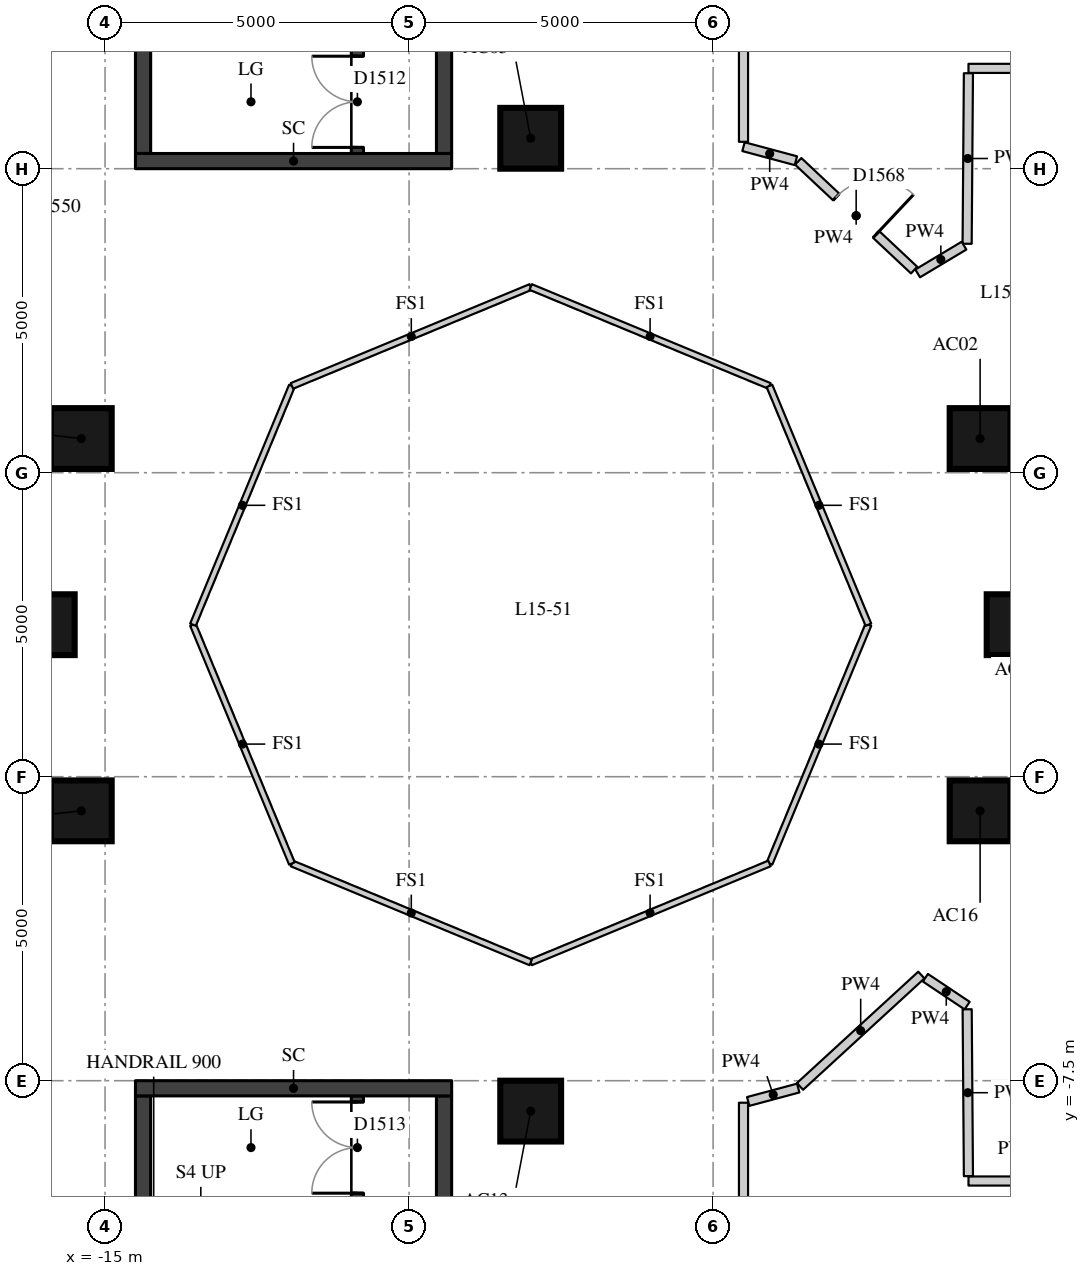
"""IFC4 building model, lengths in metres.
Left out: names, types, materials, properties, quantities, classifications, styles, units other than length and angle.
Written with IfcOpenShell. Run it as: python <this file> out.ifc"""

import sys

from ifc_helpers import new_model, si_unit, direction, frame, frame_2d, origin, origin_2d, place, context, subcontext, project, spatial, rectangle, extrude, element, fill, save


model = new_model("IFC4")
c1 = context("Model", 3, precision=1e-05, world=origin(), true_north=direction((0.0, 1.0)))
c2 = subcontext(c1, "Body", "Model", "MODEL_VIEW")
j1 = project(units=[si_unit("LENGTHUNIT", "METRE"), si_unit("PLANEANGLEUNIT", "RADIAN")], contexts=[c1])
p1 = place(None, origin())
s1 = spatial("IfcSite", under=j1, at=p1, CompositionType="ELEMENT")
p2 = place(p1, origin())
s2 = spatial("IfcBuilding", under=s1, at=p2, CompositionType="ELEMENT")
p3 = place(p2, frame((0.0, 0.0, 58.0)))
s3 = spatial("IfcBuildingStorey", under=s2, at=p3, CompositionType="ELEMENT", Elevation=58.0)
for number, where, z_axis, x_axis in (
    (1, (0.0, 0.0, 0.0), (0.0, 0.0, 1.0), (1.0, 0.0, 0.0)),
    (2, (-0.609, 3.062, 0.0), (0.0, 0.0, 1.0), (1.0, 0.0, 0.0)),
    (3, (-8.0, 8.0, 0.0), (0.0, 0.0, 1.0), (1.0, 0.0, 0.0)),
    (4, (-15.391, 3.062, 0.0), (0.0, 0.0, 1.0), (1.0, 0.0, 0.0)),
    (5, (-16.0, 0.0, 0.0), (0.0, 0.0, 1.0), (1.0, 0.0, 0.0)),
    (6, (-15.391, -3.062, 0.0), (0.0, 0.0, 1.0), (1.0, 0.0, 0.0)),
    (7, (-8.0, -8.0, 0.0), (0.0, 0.0, 1.0), (1.0, 0.0, 0.0)),
    (8, (-0.609, -3.062, 0.0), (0.0, 0.0, 1.0), (1.0, 0.0, 0.0)),
):
    element("IfcColumn", number, at=place(p3, frame(where, z_axis=z_axis, x_axis=x_axis)), inside=s3, PredefinedType="COLUMN", context=c2, shape_type="SweptSolid", body=[
        extrude(rectangle(XDim=1.0, YDim=1.0, at=origin_2d()), origin(), (0.0, 0.0, 1.0), 3.3),
    ])
p4 = place(p3, frame((-10.85, 7.75, 0.0), z_axis=(0.0, 0.0, 1.0), x_axis=(0.0, 1.0, 0.0)))
e9 = element("IfcWall", 9, at=p4, inside=s3, PredefinedType="SHEAR", context=c2, shape_type="SweptSolid", body=[
    extrude(rectangle(XDim=6.0, YDim=0.2, at=frame_2d((3.0, 0.0))), origin(), (0.0, 0.0, 1.0), 3.02),
])
p5 = place(p4, frame((0.1, 0.0, 0.0)))
e10 = element("IfcOpeningElement", 10, at=p5, cuts=e9, PredefinedType="OPENING", context=c2, shape_type="SweptSolid", body=[
    extrude(rectangle(XDim=1.5, YDim=2.1, at=frame_2d((0.75, 1.05))), frame((0.0, 0.11, 0.0), z_axis=(0.0, -1.0, 0.0), x_axis=(1.0, 0.0, 0.0)), (0.0, 0.0, 1.0), 0.22),
])
p6 = place(p3, frame((-10.85, -13.75, 0.0), z_axis=(0.0, 0.0, 1.0), x_axis=(0.0, 1.0, 0.0)))
e11 = element("IfcWall", 11, at=p6, inside=s3, PredefinedType="SHEAR", context=c2, shape_type="SweptSolid", body=[
    extrude(rectangle(XDim=6.0, YDim=0.2, at=frame_2d((3.0, 0.0))), origin(), (0.0, 0.0, 1.0), 3.02),
])
p7 = place(p6, frame((4.4, 0.0, 0.0)))
e12 = element("IfcOpeningElement", 12, at=p7, cuts=e11, PredefinedType="OPENING", context=c2, shape_type="SweptSolid", body=[
    extrude(rectangle(XDim=1.5, YDim=2.1, at=frame_2d((0.75, 1.05))), frame((0.0, 0.11, 0.0), z_axis=(0.0, -1.0, 0.0), x_axis=(1.0, 0.0, 0.0)), (0.0, 0.0, 1.0), 0.22),
])
p8 = place(p3, frame((-14.375, 7.75, -0.28), z_axis=(0.0, 0.0, 1.0), x_axis=(0.0, 1.0, 0.0)))
e13 = element("IfcWall", 13, at=p8, inside=s3, PredefinedType="SHEAR", context=c2, shape_type="SweptSolid", body=[
    extrude(rectangle(XDim=6.0, YDim=0.25, at=frame_2d((3.0, 0.0))), origin(), (0.0, 0.0, 1.0), 3.3),
])
p9 = place(p3, frame((-9.425, 7.75, -0.28), z_axis=(0.0, 0.0, 1.0), x_axis=(0.0, 1.0, 0.0)))
e14 = element("IfcWall", 14, at=p9, inside=s3, PredefinedType="SHEAR", context=c2, shape_type="SweptSolid", body=[
    extrude(rectangle(XDim=6.0, YDim=0.25, at=frame_2d((3.0, 0.0))), origin(), (0.0, 0.0, 1.0), 3.3),
])
p10 = place(p9, frame((2.1, 0.0, 0.28)))
e15 = element("IfcOpeningElement", 15, at=p10, cuts=e14, PredefinedType="OPENING", context=c2, shape_type="SweptSolid", body=[
    extrude(rectangle(XDim=1.5, YDim=2.1, at=frame_2d((0.75, 1.05))), frame((0.0, 0.135, 0.0), z_axis=(0.0, -1.0, 0.0), x_axis=(1.0, 0.0, 0.0)), (0.0, 0.0, 1.0), 0.27),
])
p11 = place(p3, frame((-14.5, 7.625, -0.28), z_axis=(0.0, 0.0, 1.0), x_axis=(1.0, 0.0, 0.0)))
e16 = element("IfcWall", 16, at=p11, inside=s3, PredefinedType="SHEAR", context=c2, shape_type="SweptSolid", body=[
    extrude(rectangle(XDim=5.2, YDim=0.25, at=frame_2d((2.6, 0.0))), origin(), (0.0, 0.0, 1.0), 3.3),
])
p12 = place(p3, frame((-14.375, -13.75, -0.28), z_axis=(0.0, 0.0, 1.0), x_axis=(0.0, 1.0, 0.0)))
e17 = element("IfcWall", 17, at=p12, inside=s3, PredefinedType="SHEAR", context=c2, shape_type="SweptSolid", body=[
    extrude(rectangle(XDim=6.0, YDim=0.25, at=frame_2d((3.0, 0.0))), origin(), (0.0, 0.0, 1.0), 3.3),
])
p13 = place(p3, frame((-9.425, -13.75, -0.28), z_axis=(0.0, 0.0, 1.0), x_axis=(0.0, 1.0, 0.0)))
e18 = element("IfcWall", 18, at=p13, inside=s3, PredefinedType="SHEAR", context=c2, shape_type="SweptSolid", body=[
    extrude(rectangle(XDim=6.0, YDim=0.25, at=frame_2d((3.0, 0.0))), origin(), (0.0, 0.0, 1.0), 3.3),
])
p14 = place(p13, frame((2.4, 0.0, 0.28)))
e19 = element("IfcOpeningElement", 19, at=p14, cuts=e18, PredefinedType="OPENING", context=c2, shape_type="SweptSolid", body=[
    extrude(rectangle(XDim=1.5, YDim=2.1, at=frame_2d((0.75, 1.05))), frame((0.0, 0.135, 0.0), z_axis=(0.0, -1.0, 0.0), x_axis=(1.0, 0.0, 0.0)), (0.0, 0.0, 1.0), 0.27),
])
p15 = place(p3, frame((-14.5, -7.625, -0.28), z_axis=(0.0, 0.0, 1.0), x_axis=(1.0, 0.0, 0.0)))
e20 = element("IfcWall", 20, at=p15, inside=s3, PredefinedType="SHEAR", context=c2, shape_type="SweptSolid", body=[
    extrude(rectangle(XDim=5.2, YDim=0.25, at=frame_2d((2.6, 0.0))), origin(), (0.0, 0.0, 1.0), 3.3),
])
p16 = place(p3, frame((0.72, 9.15, 0.0), z_axis=(0.0, 0.0, 1.0), x_axis=(-1.0, 0.0, 0.0)))
e21 = element("IfcWall", 21, at=p16, inside=s3, PredefinedType="PARTITIONING", context=c2, shape_type="SweptSolid", body=[
    extrude(rectangle(XDim=1.52, YDim=0.15, at=frame_2d((0.76, 0.0))), origin(), (0.0, 0.0, 1.0), 3.02),
])
p17 = place(p3, frame((-0.801, 9.07, 0.0), z_axis=(0.0, 0.0, 1.0), x_axis=(-0.007572902619, -0.999971325162, 0.0)))
e22 = element("IfcWall", 22, at=p17, inside=s3, PredefinedType="PARTITIONING", context=c2, shape_type="SweptSolid", body=[
    extrude(rectangle(XDim=2.805, YDim=0.15, at=frame_2d((1.402, 0.0))), origin(), (0.0, 0.0, 1.0), 3.02),
])
p18 = place(p3, frame((-0.874, 6.234, 0.0), z_axis=(0.0, 0.0, 1.0), x_axis=(-0.857759476535, -0.514051242984, 0.0)))
e23 = element("IfcWall", 23, at=p18, inside=s3, PredefinedType="PARTITIONING", context=c2, shape_type="SweptSolid", body=[
    extrude(rectangle(XDim=0.889, YDim=0.15, at=frame_2d((0.444, 0.0))), origin(), (0.0, 0.0, 1.0), 3.02),
])
p19 = place(p3, frame((-1.694, 5.832, 0.0), z_axis=(0.0, 0.0, 1.0), x_axis=(-0.729170056034, 0.684332542981, 0.0)))
e24 = element("IfcWall", 24, at=p19, inside=s3, PredefinedType="PARTITIONING", context=c2, shape_type="SweptSolid", body=[
    extrude(rectangle(XDim=2.614, YDim=0.15, at=frame_2d((1.307, 0.0))), origin(), (0.0, 0.0, 1.0), 3.02),
])
p20 = place(p19, frame((0.857, 0.0, 0.0)))
e25 = element("IfcOpeningElement", 25, at=p20, cuts=e24, PredefinedType="OPENING", context=c2, shape_type="SweptSolid", body=[
    extrude(rectangle(XDim=0.9, YDim=2.1, at=frame_2d((0.45, 1.05))), frame((0.0, 0.085, 0.0), z_axis=(0.0, -1.0, 0.0), x_axis=(1.0, 0.0, 0.0)), (0.0, 0.0, 1.0), 0.17),
])
p21 = place(p3, frame((-3.639, 7.631, 0.0), z_axis=(0.0, 0.0, 1.0), x_axis=(-0.965879594242, 0.258991523853, 0.0)))
e26 = element("IfcWall", 26, at=p21, inside=s3, PredefinedType="PARTITIONING", context=c2, shape_type="SweptSolid", body=[
    extrude(rectangle(XDim=0.892, YDim=0.15, at=frame_2d((0.446, 0.0))), origin(), (0.0, 0.0, 1.0), 3.02),
])
p22 = place(p3, frame((-4.5, 7.942, 0.0), z_axis=(0.0, 0.0, 1.0), x_axis=(0.0, 1.0, 0.0)))
e27 = element("IfcWall", 27, at=p22, inside=s3, PredefinedType="PARTITIONING", context=c2, shape_type="SweptSolid", body=[
    extrude(rectangle(XDim=3.808, YDim=0.15, at=frame_2d((1.904, 0.0))), origin(), (0.0, 0.0, 1.0), 3.02),
])
p23 = place(p3, frame((-0.8, -9.15, 0.0), z_axis=(0.0, 0.0, 1.0), x_axis=(1.0, 0.0, 0.0)))
e28 = element("IfcWall", 28, at=p23, inside=s3, PredefinedType="PARTITIONING", context=c2, shape_type="SweptSolid", body=[
    extrude(rectangle(XDim=1.6, YDim=0.15, at=frame_2d((0.8, 0.0))), origin(), (0.0, 0.0, 1.0), 3.02),
])
p24 = place(p3, frame((-4.5, -11.67, 0.0), z_axis=(0.0, 0.0, 1.0), x_axis=(0.0, 1.0, 0.0)))
e29 = element("IfcWall", 29, at=p24, inside=s3, PredefinedType="PARTITIONING", context=c2, shape_type="SweptSolid", body=[
    extrude(rectangle(XDim=3.808, YDim=0.15, at=frame_2d((1.904, 0.0))), origin(), (0.0, 0.0, 1.0), 3.02),
])
p25 = place(p3, frame((-4.423, -7.842, 0.0), z_axis=(0.0, 0.0, 1.0), x_axis=(0.965853333569, 0.259089440221, 0.0)))
e30 = element("IfcWall", 30, at=p25, inside=s3, PredefinedType="PARTITIONING", context=c2, shape_type="SweptSolid", body=[
    extrude(rectangle(XDim=0.852, YDim=0.15, at=frame_2d((0.426, 0.0))), origin(), (0.0, 0.0, 1.0), 3.02),
])
p26 = place(p3, frame((-3.571, -7.594, 0.0), z_axis=(0.0, 0.0, 1.0), x_axis=(0.736783660812, 0.676128565555, 0.0)))
e31 = element("IfcWall", 31, at=p26, inside=s3, PredefinedType="PARTITIONING", context=c2, shape_type="SweptSolid", body=[
    extrude(rectangle(XDim=2.709, YDim=0.15, at=frame_2d((1.354, 0.0))), origin(), (0.0, 0.0, 1.0), 3.02),
])
p27 = place(p3, frame((-1.509, -5.806, 0.0), z_axis=(0.0, 0.0, 1.0), x_axis=(0.831367153095, -0.55572354346, 0.0)))
e32 = element("IfcWall", 32, at=p27, inside=s3, PredefinedType="PARTITIONING", context=c2, shape_type="SweptSolid", body=[
    extrude(rectangle(XDim=0.825, YDim=0.15, at=frame_2d((0.413, 0.0))), origin(), (0.0, 0.0, 1.0), 3.02),
])
p28 = place(p3, frame((-0.822, -6.325, 0.0), z_axis=(0.0, 0.0, 1.0), x_axis=(0.007471771501, -0.999972085926, 0.0)))
e33 = element("IfcWall", 33, at=p28, inside=s3, PredefinedType="PARTITIONING", context=c2, shape_type="SweptSolid", body=[
    extrude(rectangle(XDim=2.745, YDim=0.15, at=frame_2d((1.372, 0.0))), origin(), (0.0, 0.0, 1.0), 3.02),
])
for number, where, z_axis, x_axis in (
    (34, (-2.446, 0.0, 0.0), (0.0, 0.0, 1.0), (-0.383, -0.924, 0.0)),
    (35, (-4.073, -3.927, 0.0), (0.0, 0.0, 1.0), (-0.924, -0.383, 0.0)),
    (36, (-8.0, -5.554, 0.0), (0.0, 0.0, 1.0), (-0.924, 0.383, 0.0)),
    (37, (-11.927, -3.927, 0.0), (0.0, 0.0, 1.0), (-0.383, 0.924, 0.0)),
    (38, (-13.554, 0.0, 0.0), (0.0, 0.0, 1.0), (0.383, 0.924, 0.0)),
    (39, (-11.927, 3.927, 0.0), (0.0, 0.0, 1.0), (0.924, 0.383, 0.0)),
    (40, (-8.0, 5.554, 0.0), (0.0, 0.0, 1.0), (0.924, -0.383, 0.0)),
    (41, (-4.073, 3.927, 0.0), (0.0, 0.0, 1.0), (0.383, -0.924, 0.0)),
):
    element("IfcWall", number, at=place(p3, frame(where, z_axis=z_axis, x_axis=x_axis)), inside=s3, PredefinedType="PARTITIONING", context=c2, shape_type="SweptSolid", body=[
        extrude(rectangle(XDim=4.251, YDim=0.1, at=frame_2d((2.125, 0.0))), origin(), (0.0, 0.0, 1.0), 3.02),
    ])
p29 = place(p5, origin())
e42 = element("IfcDoor", 42, at=p29, inside=s3, OperationType="DOUBLE_DOOR_SINGLE_SWING", PredefinedType="DOOR", context=c2, shape_type="SweptSolid", body=[
    extrude(rectangle(XDim=1.5, YDim=2.1, at=frame_2d((0.75, 1.05))), frame((0.0, 0.025, 0.0), z_axis=(0.0, -1.0, 0.0), x_axis=(1.0, 0.0, 0.0)), (0.0, 0.0, 1.0), 0.05),
])
fill(e10, e42)
p30 = place(p7, origin())
e43 = element("IfcDoor", 43, at=p30, inside=s3, OperationType="DOUBLE_DOOR_SINGLE_SWING", PredefinedType="DOOR", context=c2, shape_type="SweptSolid", body=[
    extrude(rectangle(XDim=1.5, YDim=2.1, at=frame_2d((0.75, 1.05))), frame((0.0, 0.025, 0.0), z_axis=(0.0, -1.0, 0.0), x_axis=(1.0, 0.0, 0.0)), (0.0, 0.0, 1.0), 0.05),
])
fill(e12, e43)
p31 = place(p20, origin())
e44 = element("IfcDoor", 44, at=p31, inside=s3, OperationType="SINGLE_SWING_RIGHT", PredefinedType="DOOR", context=c2, shape_type="SweptSolid", body=[
    extrude(rectangle(XDim=0.9, YDim=2.1, at=frame_2d((0.45, 1.05))), frame((0.0, 0.025, 0.0), z_axis=(0.0, -1.0, 0.0), x_axis=(1.0, 0.0, 0.0)), (0.0, 0.0, 1.0), 0.05),
])
fill(e25, e44)
save(model, sys.argv[1])
